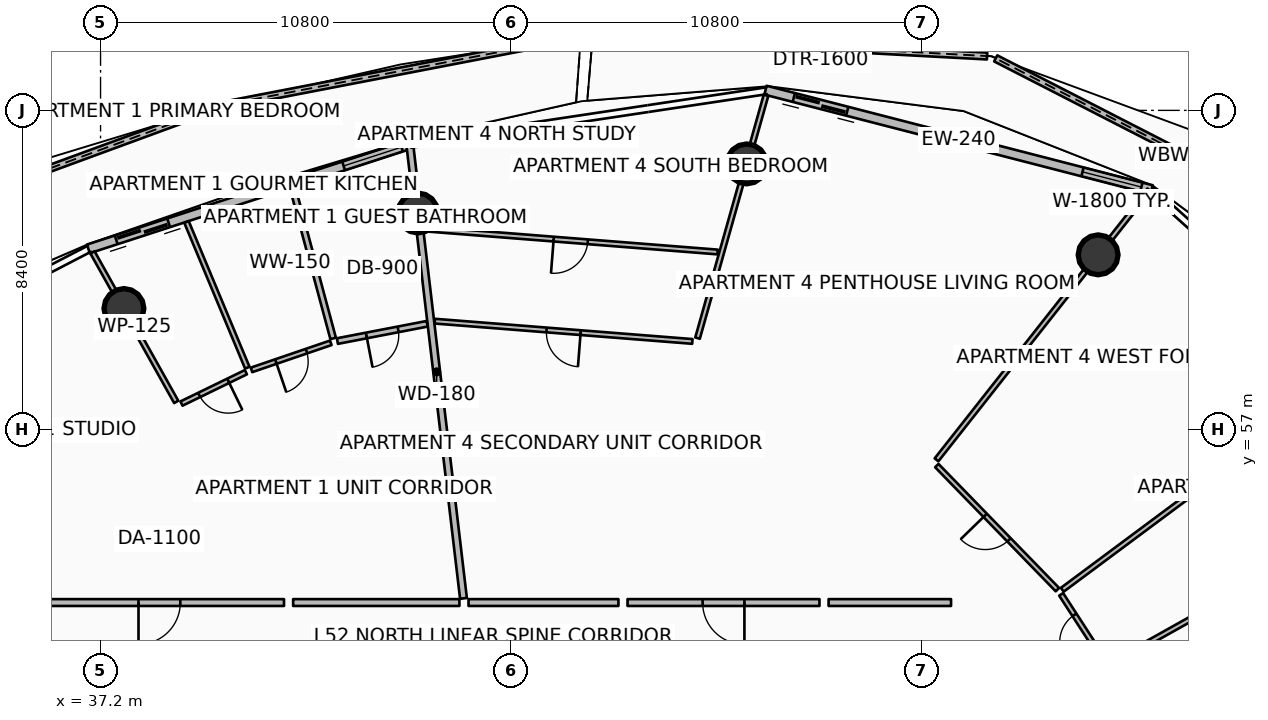
"""IFC4 building model, lengths in metres.
Left out: names, types, materials, properties, quantities, classifications, styles, units other than length and angle.
Written with IfcOpenShell. Run it as: python <this file> out.ifc"""

import sys

from ifc_helpers import new_model, si_unit, direction, frame, frame_2d, origin, origin_2d, place, context, subcontext, project, spatial, polyline, rectangle, circle, outline, extrude, element, fill, save


model = new_model("IFC4")
c1 = context("Model", 3, precision=1e-05, world=origin(), true_north=direction((0.0, 1.0)))
c2 = subcontext(c1, "Body", "Model", "MODEL_VIEW")
j1 = project(units=[si_unit("LENGTHUNIT", "METRE"), si_unit("PLANEANGLEUNIT", "RADIAN")], contexts=[c1])
p1 = place(None, origin())
s1 = spatial("IfcSite", under=j1, at=p1, CompositionType="ELEMENT")
p2 = place(p1, origin())
s2 = spatial("IfcBuilding", under=s1, at=p2, CompositionType="ELEMENT")
p3 = place(p2, frame((0.0, 0.0, 206.55)))
s3 = spatial("IfcBuildingStorey", under=s2, at=p3, CompositionType="ELEMENT", Elevation=206.55)
for number, where, z_axis, x_axis in (
    (1, (63.451, 61.599, 0.0), (0.0, 0.0, 1.0), (1.0, 0.0, 0.0)),
    (2, (54.202, 63.992, 0.0), (0.0, 0.0, 1.0), (1.0, 0.0, 0.0)),
    (3, (45.55, 62.7, 0.0), (0.0, 0.0, 1.0), (1.0, 0.0, 0.0)),
    (4, (37.815, 60.186, 0.0), (0.0, 0.0, 1.0), (1.0, 0.0, 0.0)),
):
    element("IfcColumn", number, at=place(p3, frame(where, z_axis=z_axis, x_axis=x_axis)), inside=s3, PredefinedType="COLUMN", context=c2, shape_type="SweptSolid", body=[
        extrude(circle(Radius=0.525, at=origin_2d()), origin(), (0.0, 0.0, 1.0), 3.5),
    ])
p4 = place(p3, frame((70.726, 61.651, 0.0), z_axis=(0.0, 0.0, 1.0), x_axis=(-0.889659107665, 0.456625308266, 0.0)))
e5 = element("IfcWall", 5, at=p4, inside=s3, PredefinedType="PARAPET", context=c2, shape_type="SweptSolid", body=[
    extrude(outline(polyline([(0.0, 0.0), (11.208, 0.0), (11.208, 1.148), (5.604, 1.284), (0.0, 1.483), (0.0, 0.0)])), frame((0.0, 0.09, 0.0), z_axis=(0.0, -1.0, 0.0), x_axis=(1.0, 0.0, 0.0)), (0.0, 0.0, 1.0), 0.18),
])
p5 = place(p3, frame((60.528, 66.83, 0.0), z_axis=(0.0, 0.0, 1.0), x_axis=(-0.998572477619, 0.053413546421, 0.0)))
e6 = element("IfcWall", 6, at=p5, inside=s3, PredefinedType="PARAPET", context=c2, shape_type="SweptSolid", body=[
    extrude(outline(polyline([(0.0, 0.0), (10.389, 0.0), (10.389, 1.224), (5.195, 1.127), (0.0, 1.148), (0.0, 0.0)])), frame((0.0, 0.09, 0.0), z_axis=(0.0, -1.0, 0.0), x_axis=(1.0, 0.0, 0.0)), (0.0, 0.0, 1.0), 0.18),
])
p6 = place(p3, frame((49.839, 67.351, 0.0), z_axis=(0.0, 0.0, 1.0), x_axis=(-0.981918699124, -0.189303112259, 0.0)))
e7 = element("IfcWall", 7, at=p6, inside=s3, PredefinedType="PARAPET", context=c2, shape_type="SweptSolid", body=[
    extrude(outline(polyline([(0.0, 0.0), (9.537, 0.0), (9.537, 1.632), (4.769, 1.418), (0.0, 1.233), (0.0, 0.0)])), frame((0.0, 0.09, 0.0), z_axis=(0.0, -1.0, 0.0), x_axis=(1.0, 0.0, 0.0)), (0.0, 0.0, 1.0), 0.18),
])
p7 = place(p3, frame((40.244, 65.482, 0.0), z_axis=(0.0, 0.0, 1.0), x_axis=(-0.938669265972, -0.344818806214, 0.0)))
e8 = element("IfcWall", 8, at=p7, inside=s3, PredefinedType="PARAPET", context=c2, shape_type="SweptSolid", body=[
    extrude(outline(polyline([(0.0, 0.0), (9.803, 0.0), (9.802, 1.86), (4.901, 1.798), (0.0, 1.632), (0.0, 0.0)])), frame((0.0, 0.09, 0.0), z_axis=(0.0, -1.0, 0.0), x_axis=(1.0, 0.0, 0.0)), (0.0, 0.0, 1.0), 0.18),
])
p8 = place(p3, frame((64.86, 63.313, 0.0), z_axis=(0.0, 0.0, 1.0), x_axis=(-0.968374028006, 0.249502989727, 0.0)))
e9 = element("IfcWall", 9, at=p8, inside=s3, PredefinedType="SOLIDWALL", context=c2, shape_type="SweptSolid", body=[
    extrude(rectangle(XDim=10.494, YDim=0.24, at=frame_2d((5.247, 0.0))), origin(), (0.0, 0.0, 1.0), 2.45),
])
p9 = place(p8, frame((8.274, 0.0, 0.0)))
e10 = element("IfcOpeningElement", 10, at=p9, cuts=e9, PredefinedType="OPENING", context=c2, shape_type="SweptSolid", body=[
    extrude(rectangle(XDim=1.45, YDim=2.15, at=frame_2d((0.725, 1.075))), frame((0.0, 0.13, 0.0), z_axis=(0.0, -1.0, 0.0), x_axis=(1.0, 0.0, 0.0)), (0.0, 0.0, 1.0), 0.26),
])
p10 = place(p8, frame((0.28, 0.0, 0.65)))
e11 = element("IfcOpeningElement", 11, at=p10, cuts=e9, PredefinedType="OPENING", context=c2, shape_type="SweptSolid", body=[
    extrude(rectangle(XDim=1.6, YDim=1.5, at=frame_2d((0.8, 0.75))), frame((0.0, 0.13, 0.0), z_axis=(0.0, -1.0, 0.0), x_axis=(1.0, 0.0, 0.0)), (0.0, 0.0, 1.0), 0.26),
])
p11 = place(p3, frame((45.384, 64.519, 0.0), z_axis=(0.0, 0.0, 1.0), x_axis=(-0.951058543936, -0.309010753869, 0.0)))
e12 = element("IfcWall", 12, at=p11, inside=s3, PredefinedType="SOLIDWALL", context=c2, shape_type="SweptSolid", body=[
    extrude(rectangle(XDim=8.942, YDim=0.24, at=frame_2d((4.471, 0.0))), origin(), (0.0, 0.0, 1.0), 2.45),
])
p12 = place(p11, frame((6.722, 0.0, 0.0)))
e13 = element("IfcOpeningElement", 13, at=p12, cuts=e12, PredefinedType="OPENING", context=c2, shape_type="SweptSolid", body=[
    extrude(rectangle(XDim=1.45, YDim=2.15, at=frame_2d((0.725, 1.075))), frame((0.0, 0.13, 0.0), z_axis=(0.0, -1.0, 0.0), x_axis=(1.0, 0.0, 0.0)), (0.0, 0.0, 1.0), 0.26),
])
p13 = place(p11, frame((0.28, 0.0, 0.65)))
e14 = element("IfcOpeningElement", 14, at=p13, cuts=e12, PredefinedType="OPENING", context=c2, shape_type="SweptSolid", body=[
    extrude(rectangle(XDim=1.6, YDim=1.5, at=frame_2d((0.8, 0.75))), frame((0.0, 0.13, 0.0), z_axis=(0.0, -1.0, 0.0), x_axis=(1.0, 0.0, 0.0)), (0.0, 0.0, 1.0), 0.26),
])
p14 = place(p3, frame((46.75, 52.559, 0.0), z_axis=(0.0, 0.0, 1.0), x_axis=(-0.117528079883, 0.993069559718, 0.0)))
e15 = element("IfcWall", 15, at=p14, inside=s3, PredefinedType="PARTITIONING", context=c2, shape_type="SweptSolid", body=[
    extrude(rectangle(XDim=12.003, YDim=0.18, at=frame_2d((6.001, 0.0))), origin(), (0.0, 0.0, 1.0), 2.94),
])
p15 = place(p3, frame((42.028, 52.45, 0.0), z_axis=(0.0, 0.0, 1.0), x_axis=(-1.0, 0.0, 0.0)))
e16 = element("IfcWall", 16, at=p15, inside=s3, PredefinedType="PARTITIONING", context=c2, shape_type="SweptSolid", body=[
    extrude(rectangle(XDim=6.558, YDim=0.18, at=frame_2d((3.279, 0.0))), origin(), (0.0, 0.0, 1.0), 2.94),
])
p16 = place(p15, frame((2.729, 0.0, 0.0)))
e17 = element("IfcOpeningElement", 17, at=p16, cuts=e16, PredefinedType="OPENING", context=c2, shape_type="SweptSolid", body=[
    extrude(rectangle(XDim=1.1, YDim=2.1, at=frame_2d((0.55, 1.05))), frame((0.0, 0.1, 0.0), z_axis=(0.0, -1.0, 0.0), x_axis=(1.0, 0.0, 0.0)), (0.0, 0.0, 1.0), 0.2),
])
p17 = place(p3, frame((46.643, 52.45, 0.0), z_axis=(0.0, 0.0, 1.0), x_axis=(-1.0, 0.0, 0.0)))
e18 = element("IfcWall", 18, at=p17, inside=s3, PredefinedType="PARTITIONING", context=c2, shape_type="SweptSolid", body=[
    extrude(rectangle(XDim=4.376, YDim=0.18, at=frame_2d((2.188, 0.0))), origin(), (0.0, 0.0, 1.0), 2.94),
])
p18 = place(p3, frame((39.191, 57.729, 0.0), z_axis=(0.0, 0.0, 1.0), x_axis=(-0.48860171964, 0.872506939551, 0.0)))
e19 = element("IfcWall", 19, at=p18, inside=s3, PredefinedType="PARTITIONING", context=c2, shape_type="SweptSolid", body=[
    extrude(rectangle(XDim=4.508, YDim=0.125, at=frame_2d((2.254, 0.0))), origin(), (0.0, 0.0, 1.0), 2.94),
])
p19 = place(p3, frame((45.795, 59.785, 0.0), z_axis=(0.0, 0.0, 1.0), x_axis=(-0.981945593386, -0.189163557882, 0.0)))
e20 = element("IfcWall", 20, at=p19, inside=s3, PredefinedType="PARTITIONING", context=c2, shape_type="SweptSolid", body=[
    extrude(rectangle(XDim=2.406, YDim=0.15, at=frame_2d((1.203, 0.0))), origin(), (0.0, 0.0, 1.0), 2.94),
])
p20 = place(p19, frame((0.778, 0.0, 0.0)))
e21 = element("IfcOpeningElement", 21, at=p20, cuts=e20, PredefinedType="OPENING", context=c2, shape_type="SweptSolid", body=[
    extrude(rectangle(XDim=0.85, YDim=2.06, at=frame_2d((0.425, 1.03))), frame((0.0, 0.085, 0.0), z_axis=(0.0, -1.0, 0.0), x_axis=(1.0, 0.0, 0.0)), (0.0, 0.0, 1.0), 0.17),
])
p21 = place(p3, frame((43.321, 59.4, 0.0), z_axis=(0.0, 0.0, 1.0), x_axis=(-0.259683834326, 0.9656936917, 0.0)))
e22 = element("IfcWall", 22, at=p21, inside=s3, PredefinedType="PARTITIONING", context=c2, shape_type="SweptSolid", body=[
    extrude(rectangle(XDim=4.111, YDim=0.15, at=frame_2d((2.056, 0.0))), origin(), (0.0, 0.0, 1.0), 2.94),
])
p22 = place(p3, frame((41.062, 58.629, 0.0), z_axis=(0.0, 0.0, 1.0), x_axis=(-0.385086773066, 0.922880369934, 0.0)))
e23 = element("IfcWall", 23, at=p22, inside=s3, PredefinedType="PARTITIONING", context=c2, shape_type="SweptSolid", body=[
    extrude(rectangle(XDim=4.155, YDim=0.125, at=frame_2d((2.078, 0.0))), origin(), (0.0, 0.0, 1.0), 2.94),
])
p23 = place(p3, frame((43.259, 59.284, 0.0), z_axis=(0.0, 0.0, 1.0), x_axis=(-0.946366372143, -0.323095480743, 0.0)))
e24 = element("IfcWall", 24, at=p23, inside=s3, PredefinedType="PARTITIONING", context=c2, shape_type="SweptSolid", body=[
    extrude(rectangle(XDim=2.205, YDim=0.125, at=frame_2d((1.103, 0.0))), origin(), (0.0, 0.0, 1.0), 2.94),
])
p24 = place(p23, frame((0.677, 0.0, 0.0)))
e25 = element("IfcOpeningElement", 25, at=p24, cuts=e24, PredefinedType="OPENING", context=c2, shape_type="SweptSolid", body=[
    extrude(rectangle(XDim=0.85, YDim=2.06, at=frame_2d((0.425, 1.03))), frame((0.0, 0.073, 0.0), z_axis=(0.0, -1.0, 0.0), x_axis=(1.0, 0.0, 0.0)), (0.0, 0.0, 1.0), 0.145),
])
p25 = place(p3, frame((41.024, 58.51, 0.0), z_axis=(0.0, 0.0, 1.0), x_axis=(-0.899168967124, -0.437601609414, 0.0)))
e26 = element("IfcWall", 26, at=p25, inside=s3, PredefinedType="PARTITIONING", context=c2, shape_type="SweptSolid", body=[
    extrude(rectangle(XDim=1.885, YDim=0.125, at=frame_2d((0.942, 0.0))), origin(), (0.0, 0.0, 1.0), 2.94),
])
p26 = place(p25, frame((0.517, 0.0, 0.0)))
e27 = element("IfcOpeningElement", 27, at=p26, cuts=e26, PredefinedType="OPENING", context=c2, shape_type="SweptSolid", body=[
    extrude(rectangle(XDim=0.85, YDim=2.06, at=frame_2d((0.425, 1.03))), frame((0.0, 0.073, 0.0), z_axis=(0.0, -1.0, 0.0), x_axis=(1.0, 0.0, 0.0)), (0.0, 0.0, 1.0), 0.145),
])
p27 = place(p3, frame((56.118, 52.45, 0.0), z_axis=(0.0, 0.0, 1.0), x_axis=(-1.0, 0.0, 0.0)))
e28 = element("IfcWall", 28, at=p27, inside=s3, PredefinedType="PARTITIONING", context=c2, shape_type="SweptSolid", body=[
    extrude(rectangle(XDim=5.051, YDim=0.18, at=frame_2d((2.525, 0.0))), origin(), (0.0, 0.0, 1.0), 2.94),
])
p28 = place(p27, frame((1.975, 0.0, 0.0)))
e29 = element("IfcOpeningElement", 29, at=p28, cuts=e28, PredefinedType="OPENING", context=c2, shape_type="SweptSolid", body=[
    extrude(rectangle(XDim=1.1, YDim=2.1, at=frame_2d((0.55, 1.05))), frame((0.0, 0.1, 0.0), z_axis=(0.0, -1.0, 0.0), x_axis=(1.0, 0.0, 0.0)), (0.0, 0.0, 1.0), 0.2),
])
p29 = place(p3, frame((64.859, 48.522, 0.0), z_axis=(0.0, 0.0, 1.0), x_axis=(0.93264258635, 0.360801616025, 0.0)))
e30 = element("IfcWall", 30, at=p29, inside=s3, PredefinedType="PARTITIONING", context=c2, shape_type="SweptSolid", body=[
    extrude(rectangle(XDim=9.323, YDim=0.125, at=frame_2d((4.662, 0.0))), origin(), (0.0, 0.0, 1.0), 2.94),
])
p30 = place(p3, frame((59.58, 52.45, 0.0), z_axis=(0.0, 0.0, 1.0), x_axis=(-1.0, 0.0, 0.0)))
e31 = element("IfcWall", 31, at=p30, inside=s3, PredefinedType="PARTITIONING", context=c2, shape_type="SweptSolid", body=[
    extrude(rectangle(XDim=3.222, YDim=0.18, at=frame_2d((1.611, 0.0))), origin(), (0.0, 0.0, 1.0), 2.94),
])
p31 = place(p3, frame((63.781, 50.838, 0.0), z_axis=(0.0, 0.0, 1.0), x_axis=(0.87249667769, 0.488620044022, 0.0)))
e32 = element("IfcWall", 32, at=p31, inside=s3, PredefinedType="PARTITIONING", context=c2, shape_type="SweptSolid", body=[
    extrude(rectangle(XDim=9.808, YDim=0.125, at=frame_2d((4.904, 0.0))), origin(), (0.0, 0.0, 1.0), 2.94),
])
p32 = place(p3, frame((59.198, 56.204, 0.0), z_axis=(0.0, 0.0, 1.0), x_axis=(0.619095305497, 0.785315861747, 0.0)))
e33 = element("IfcWall", 33, at=p32, inside=s3, PredefinedType="PARTITIONING", context=c2, shape_type="SweptSolid", body=[
    extrude(rectangle(XDim=9.043, YDim=0.125, at=frame_2d((4.521, 0.0))), origin(), (0.0, 0.0, 1.0), 2.94),
])
p33 = place(p3, frame((62.507, 52.786, 0.0), z_axis=(0.0, 0.0, 1.0), x_axis=(0.802514437248, 0.596632699413, 0.0)))
e34 = element("IfcWall", 34, at=p33, inside=s3, PredefinedType="PARTITIONING", context=c2, shape_type="SweptSolid", body=[
    extrude(rectangle(XDim=9.551, YDim=0.125, at=frame_2d((4.775, 0.0))), origin(), (0.0, 0.0, 1.0), 2.94),
])
p34 = place(p3, frame((63.639, 50.873, 0.0), z_axis=(0.0, 0.0, 1.0), x_axis=(-0.543701600377, 0.839278600792, 0.0)))
e35 = element("IfcWall", 35, at=p34, inside=s3, PredefinedType="PARTITIONING", context=c2, shape_type="SweptSolid", body=[
    extrude(rectangle(XDim=2.135, YDim=0.125, at=frame_2d((1.068, 0.0))), origin(), (0.0, 0.0, 1.0), 2.94),
])
p35 = place(p34, frame((0.643, 0.0, 0.0)))
e36 = element("IfcOpeningElement", 36, at=p35, cuts=e35, PredefinedType="OPENING", context=c2, shape_type="SweptSolid", body=[
    extrude(rectangle(XDim=0.85, YDim=2.06, at=frame_2d((0.425, 1.03))), frame((0.0, 0.073, 0.0), z_axis=(0.0, -1.0, 0.0), x_axis=(1.0, 0.0, 0.0)), (0.0, 0.0, 1.0), 0.145),
])
p36 = place(p3, frame((62.379, 52.789, 0.0), z_axis=(0.0, 0.0, 1.0), x_axis=(-0.697062312207, 0.717010552852, 0.0)))
e37 = element("IfcWall", 37, at=p36, inside=s3, PredefinedType="PARTITIONING", context=c2, shape_type="SweptSolid", body=[
    extrude(rectangle(XDim=4.553, YDim=0.125, at=frame_2d((2.276, 0.0))), origin(), (0.0, 0.0, 1.0), 2.94),
])
p37 = place(p36, frame((1.826, 0.0, 0.0)))
e38 = element("IfcOpeningElement", 38, at=p37, cuts=e37, PredefinedType="OPENING", context=c2, shape_type="SweptSolid", body=[
    extrude(rectangle(XDim=0.9, YDim=2.08, at=frame_2d((0.45, 1.04))), frame((0.0, 0.073, 0.0), z_axis=(0.0, -1.0, 0.0), x_axis=(1.0, 0.0, 0.0)), (0.0, 0.0, 1.0), 0.145),
])
p38 = place(p3, frame((50.827, 52.45, 0.0), z_axis=(0.0, 0.0, 1.0), x_axis=(-1.0, 0.0, 0.0)))
e39 = element("IfcWall", 39, at=p38, inside=s3, PredefinedType="PARTITIONING", context=c2, shape_type="SweptSolid", body=[
    extrude(rectangle(XDim=3.944, YDim=0.18, at=frame_2d((1.972, 0.0))), origin(), (0.0, 0.0, 1.0), 2.94),
])
p39 = place(p3, frame((52.909, 59.408, 0.0), z_axis=(0.0, 0.0, 1.0), x_axis=(0.271461038327, 0.962449429669, 0.0)))
e40 = element("IfcWall", 40, at=p39, inside=s3, PredefinedType="PARTITIONING", context=c2, shape_type="SweptSolid", body=[
    extrude(rectangle(XDim=6.64, YDim=0.125, at=frame_2d((3.32, 0.0))), origin(), (0.0, 0.0, 1.0), 2.94),
])
p40 = place(p3, frame((52.773, 59.32, 0.0), z_axis=(0.0, 0.0, 1.0), x_axis=(-0.996916436686, 0.078470492963, 0.0)))
e41 = element("IfcWall", 41, at=p40, inside=s3, PredefinedType="PARTITIONING", context=c2, shape_type="SweptSolid", body=[
    extrude(rectangle(XDim=6.798, YDim=0.125, at=frame_2d((3.399, 0.0))), origin(), (0.0, 0.0, 1.0), 2.94),
])
p41 = place(p40, frame((2.949, 0.0, 0.0)))
e42 = element("IfcOpeningElement", 42, at=p41, cuts=e41, PredefinedType="OPENING", context=c2, shape_type="SweptSolid", body=[
    extrude(rectangle(XDim=0.9, YDim=2.08, at=frame_2d((0.45, 1.04))), frame((0.0, 0.073, 0.0), z_axis=(0.0, -1.0, 0.0), x_axis=(1.0, 0.0, 0.0)), (0.0, 0.0, 1.0), 0.145),
])
p42 = place(p3, frame((53.436, 61.674, 0.0), z_axis=(0.0, 0.0, 1.0), x_axis=(-0.996917885084, 0.078452089838, 0.0)))
e43 = element("IfcWall", 43, at=p42, inside=s3, PredefinedType="PARTITIONING", context=c2, shape_type="SweptSolid", body=[
    extrude(rectangle(XDim=7.752, YDim=0.125, at=frame_2d((3.876, 0.0))), origin(), (0.0, 0.0, 1.0), 2.94),
])
p43 = place(p42, frame((3.426, 0.0, 0.0)))
e44 = element("IfcOpeningElement", 44, at=p43, cuts=e43, PredefinedType="OPENING", context=c2, shape_type="SweptSolid", body=[
    extrude(rectangle(XDim=0.9, YDim=2.08, at=frame_2d((0.45, 1.04))), frame((0.0, 0.073, 0.0), z_axis=(0.0, -1.0, 0.0), x_axis=(1.0, 0.0, 0.0)), (0.0, 0.0, 1.0), 0.145),
])
p44 = place(p9, origin())
e45 = element("IfcDoor", 45, at=p44, inside=s3, OperationType="DOUBLE_DOOR_SLIDING", PredefinedType="DOOR", context=c2, shape_type="SweptSolid", body=[
    extrude(rectangle(XDim=1.45, YDim=2.15, at=frame_2d((0.725, 1.075))), frame((0.0, 0.025, 0.0), z_axis=(0.0, -1.0, 0.0), x_axis=(1.0, 0.0, 0.0)), (0.0, 0.0, 1.0), 0.05),
])
fill(e10, e45)
p45 = place(p10, origin())
e46 = element("IfcWindow", 46, at=p45, inside=s3, PartitioningType="SINGLE_PANEL", PredefinedType="WINDOW", context=c2, shape_type="SweptSolid", body=[
    extrude(rectangle(XDim=1.6, YDim=1.5, at=frame_2d((0.8, 0.75))), frame((0.0, 0.03, 0.0), z_axis=(0.0, -1.0, 0.0), x_axis=(1.0, 0.0, 0.0)), (0.0, 0.0, 1.0), 0.06),
])
fill(e11, e46)
p46 = place(p12, origin())
e47 = element("IfcDoor", 47, at=p46, inside=s3, OperationType="DOUBLE_DOOR_SLIDING", PredefinedType="DOOR", context=c2, shape_type="SweptSolid", body=[
    extrude(rectangle(XDim=1.45, YDim=2.15, at=frame_2d((0.725, 1.075))), frame((0.0, 0.025, 0.0), z_axis=(0.0, -1.0, 0.0), x_axis=(1.0, 0.0, 0.0)), (0.0, 0.0, 1.0), 0.05),
])
fill(e13, e47)
p47 = place(p13, origin())
e48 = element("IfcWindow", 48, at=p47, inside=s3, PartitioningType="SINGLE_PANEL", PredefinedType="WINDOW", context=c2, shape_type="SweptSolid", body=[
    extrude(rectangle(XDim=1.6, YDim=1.5, at=frame_2d((0.8, 0.75))), frame((0.0, 0.03, 0.0), z_axis=(0.0, -1.0, 0.0), x_axis=(1.0, 0.0, 0.0)), (0.0, 0.0, 1.0), 0.06),
])
fill(e14, e48)
p48 = place(p16, origin())
e49 = element("IfcDoor", 49, at=p48, inside=s3, OperationType="SINGLE_SWING_RIGHT", PredefinedType="DOOR", context=c2, shape_type="SweptSolid", body=[
    extrude(rectangle(XDim=1.1, YDim=2.1, at=frame_2d((0.55, 1.05))), frame((0.0, 0.025, 0.0), z_axis=(0.0, -1.0, 0.0), x_axis=(1.0, 0.0, 0.0)), (0.0, 0.0, 1.0), 0.05),
])
fill(e17, e49)
p49 = place(p20, origin())
e50 = element("IfcDoor", 50, at=p49, inside=s3, OperationType="SINGLE_SWING_RIGHT", PredefinedType="DOOR", context=c2, shape_type="SweptSolid", body=[
    extrude(rectangle(XDim=0.85, YDim=2.06, at=frame_2d((0.425, 1.03))), frame((0.0, 0.025, 0.0), z_axis=(0.0, -1.0, 0.0), x_axis=(1.0, 0.0, 0.0)), (0.0, 0.0, 1.0), 0.05),
])
fill(e21, e50)
p50 = place(p24, origin())
e51 = element("IfcDoor", 51, at=p50, inside=s3, OperationType="SINGLE_SWING_RIGHT", PredefinedType="DOOR", context=c2, shape_type="SweptSolid", body=[
    extrude(rectangle(XDim=0.85, YDim=2.06, at=frame_2d((0.425, 1.03))), frame((0.0, 0.025, 0.0), z_axis=(0.0, -1.0, 0.0), x_axis=(1.0, 0.0, 0.0)), (0.0, 0.0, 1.0), 0.05),
])
fill(e25, e51)
p51 = place(p26, origin())
e52 = element("IfcDoor", 52, at=p51, inside=s3, OperationType="SINGLE_SWING_LEFT", PredefinedType="DOOR", context=c2, shape_type="SweptSolid", body=[
    extrude(rectangle(XDim=0.85, YDim=2.06, at=frame_2d((0.425, 1.03))), frame((0.0, 0.025, 0.0), z_axis=(0.0, -1.0, 0.0), x_axis=(1.0, 0.0, 0.0)), (0.0, 0.0, 1.0), 0.05),
])
fill(e27, e52)
p52 = place(p28, origin())
e53 = element("IfcDoor", 53, at=p52, inside=s3, OperationType="SINGLE_SWING_LEFT", PredefinedType="DOOR", context=c2, shape_type="SweptSolid", body=[
    extrude(rectangle(XDim=1.1, YDim=2.1, at=frame_2d((0.55, 1.05))), frame((0.0, 0.025, 0.0), z_axis=(0.0, -1.0, 0.0), x_axis=(1.0, 0.0, 0.0)), (0.0, 0.0, 1.0), 0.05),
])
fill(e29, e53)
p53 = place(p35, origin())
e54 = element("IfcDoor", 54, at=p53, inside=s3, OperationType="SINGLE_SWING_LEFT", PredefinedType="DOOR", context=c2, shape_type="SweptSolid", body=[
    extrude(rectangle(XDim=0.85, YDim=2.06, at=frame_2d((0.425, 1.03))), frame((0.0, 0.025, 0.0), z_axis=(0.0, -1.0, 0.0), x_axis=(1.0, 0.0, 0.0)), (0.0, 0.0, 1.0), 0.05),
])
fill(e36, e54)
p54 = place(p37, origin())
e55 = element("IfcDoor", 55, at=p54, inside=s3, OperationType="SINGLE_SWING_RIGHT", PredefinedType="DOOR", context=c2, shape_type="SweptSolid", body=[
    extrude(rectangle(XDim=0.9, YDim=2.08, at=frame_2d((0.45, 1.04))), frame((0.0, 0.025, 0.0), z_axis=(0.0, -1.0, 0.0), x_axis=(1.0, 0.0, 0.0)), (0.0, 0.0, 1.0), 0.05),
])
fill(e38, e55)
p55 = place(p41, origin())
e56 = element("IfcDoor", 56, at=p55, inside=s3, OperationType="SINGLE_SWING_LEFT", PredefinedType="DOOR", context=c2, shape_type="SweptSolid", body=[
    extrude(rectangle(XDim=0.9, YDim=2.08, at=frame_2d((0.45, 1.04))), frame((0.0, 0.025, 0.0), z_axis=(0.0, -1.0, 0.0), x_axis=(1.0, 0.0, 0.0)), (0.0, 0.0, 1.0), 0.05),
])
fill(e42, e56)
p56 = place(p43, origin())
e57 = element("IfcDoor", 57, at=p56, inside=s3, OperationType="SINGLE_SWING_RIGHT", PredefinedType="DOOR", context=c2, shape_type="SweptSolid", body=[
    extrude(rectangle(XDim=0.9, YDim=2.08, at=frame_2d((0.45, 1.04))), frame((0.0, 0.025, 0.0), z_axis=(0.0, -1.0, 0.0), x_axis=(1.0, 0.0, 0.0)), (0.0, 0.0, 1.0), 0.05),
])
fill(e44, e57)
save(model, sys.argv[1])
